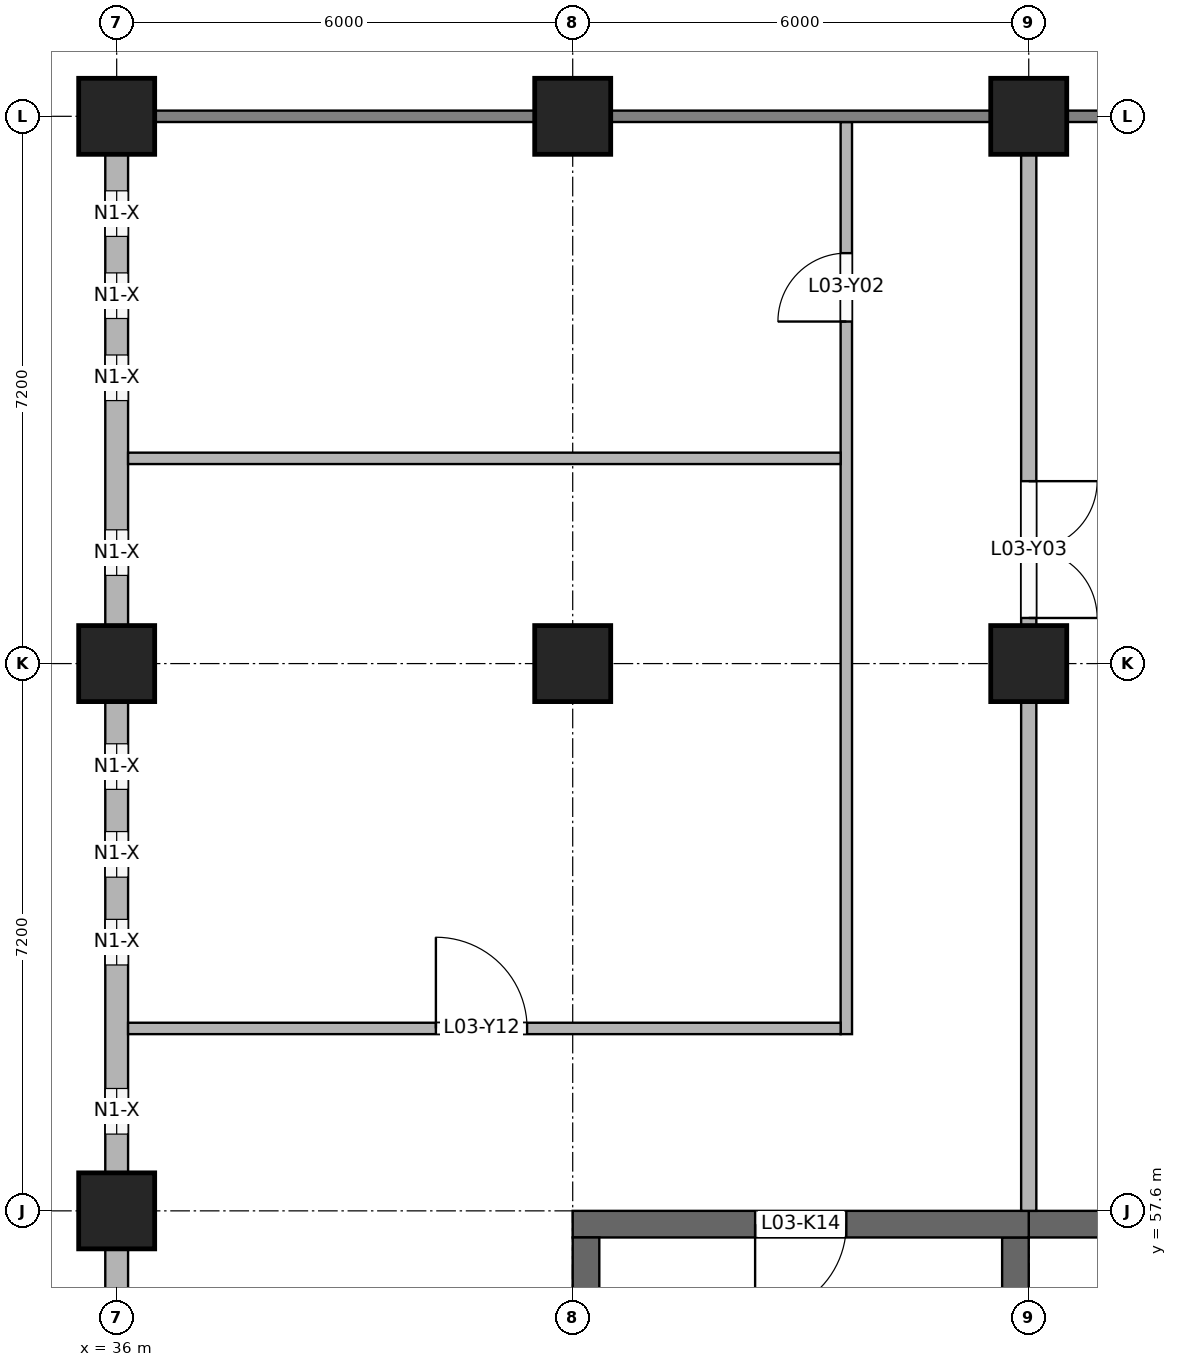
"""IFC4 building model, lengths in metres.
Left out: names, types, materials, properties, quantities, classifications, styles, units other than length and angle.
Written with IfcOpenShell. Run it as: python <this file> out.ifc"""

import sys

from ifc_helpers import new_model, si_unit, direction, frame, frame_2d, origin, origin_2d, place, context, subcontext, project, spatial, rectangle, extrude, element, fill, save


model = new_model("IFC4")
c1 = context("Model", 3, precision=1e-05, world=origin(), true_north=direction((0.0, 1.0)))
c2 = subcontext(c1, "Body", "Model", "MODEL_VIEW")
j1 = project(units=[si_unit("LENGTHUNIT", "METRE"), si_unit("PLANEANGLEUNIT", "RADIAN")], contexts=[c1])
p1 = place(None, origin())
s1 = spatial("IfcSite", under=j1, at=p1, CompositionType="ELEMENT")
p2 = place(p1, origin())
s2 = spatial("IfcBuilding", under=s1, at=p2, CompositionType="ELEMENT")
p3 = place(p2, frame((0.0, 0.0, 12.6)))
s3 = spatial("IfcBuildingStorey", under=s2, at=p3, CompositionType="ELEMENT", Elevation=12.6)
p4 = place(p3, frame((42.0, 57.425, 0.0), z_axis=(0.0, 0.0, 1.0), x_axis=(1.0, 0.0, 0.0)))
e1 = element("IfcWall", 1, at=p4, inside=s3, PredefinedType="SHEAR", context=c2, shape_type="SweptSolid", body=[
    extrude(rectangle(XDim=6.0, YDim=0.35, at=frame_2d((3.0, 0.0))), origin(), (0.0, 0.0, 1.0), 4.0),
])
p5 = place(p4, frame((2.4, 0.0, 0.0)))
e2 = element("IfcOpeningElement", 2, at=p5, cuts=e1, PredefinedType="OPENING", context=c2, shape_type="SweptSolid", body=[
    extrude(rectangle(XDim=1.2, YDim=2.1, at=frame_2d((0.6, 1.05))), frame((0.0, 0.185, 0.0), z_axis=(0.0, -1.0, 0.0), x_axis=(1.0, 0.0, 0.0)), (0.0, 0.0, 1.0), 0.37),
])
for number, where, z_axis, x_axis in (
    (3, (42.175, 50.75, 0.0), (0.0, 0.0, 1.0), (0.0, 1.0, 0.0)),
    (4, (47.825, 50.75, 0.0), (0.0, 0.0, 1.0), (0.0, 1.0, 0.0)),
):
    element("IfcWall", number, at=place(p3, frame(where, z_axis=z_axis, x_axis=x_axis)), inside=s3, PredefinedType="SHEAR", context=c2, shape_type="SweptSolid", body=[
        extrude(rectangle(XDim=6.5, YDim=0.35, at=frame_2d((3.25, 0.0))), origin(), (0.0, 0.0, 1.0), 4.0),
    ])
p6 = place(p3, frame((48.0, 57.425, 0.0), z_axis=(0.0, 0.0, 1.0), x_axis=(1.0, 0.0, 0.0)))
e5 = element("IfcWall", 5, at=p6, inside=s3, PredefinedType="SHEAR", context=c2, shape_type="SweptSolid", body=[
    extrude(rectangle(XDim=3.0, YDim=0.35, at=frame_2d((1.5, 0.0))), origin(), (0.0, 0.0, 1.0), 4.2),
])
for number, where, z_axis, x_axis in (
    (6, (36.0, 57.6, 0.0), (0.0, 0.0, 1.0), (1.0, 0.0, 0.0)),
    (7, (36.0, 64.8, 0.0), (0.0, 0.0, 1.0), (1.0, 0.0, 0.0)),
    (8, (42.0, 64.8, 0.0), (0.0, 0.0, 1.0), (1.0, 0.0, 0.0)),
    (9, (48.0, 64.8, 0.0), (0.0, 0.0, 1.0), (1.0, 0.0, 0.0)),
    (10, (36.0, 72.0, 0.0), (0.0, 0.0, 1.0), (1.0, 0.0, 0.0)),
    (11, (42.0, 72.0, 0.0), (0.0, 0.0, 1.0), (1.0, 0.0, 0.0)),
    (12, (48.0, 72.0, 0.0), (0.0, 0.0, 1.0), (1.0, 0.0, 0.0)),
):
    element("IfcColumn", number, at=place(p3, frame(where, z_axis=z_axis, x_axis=x_axis)), inside=s3, PredefinedType="COLUMN", context=c2, shape_type="SweptSolid", body=[
        extrude(rectangle(XDim=1.0, YDim=1.0, at=origin_2d()), origin(), (0.0, 0.0, 1.0), 4.0),
    ])
p7 = place(p3, frame((36.0, 50.9, 0.0), z_axis=(0.0, 0.0, 1.0), x_axis=(0.0, 1.0, 0.0)))
e13 = element("IfcWall", 13, at=p7, inside=s3, PredefinedType="SOLIDWALL", context=c2, shape_type="SweptSolid", body=[
    extrude(rectangle(XDim=6.2, YDim=0.3, at=frame_2d((3.1, 0.0))), origin(), (0.0, 0.0, 1.0), 3.1),
])
p8 = place(p7, frame((0.533, 0.0, 0.9)))
e14 = element("IfcOpeningElement", 14, at=p8, cuts=e13, PredefinedType="OPENING", context=c2, shape_type="SweptSolid", body=[
    extrude(rectangle(XDim=0.6, YDim=1.9, at=frame_2d((0.3, 0.95))), frame((0.0, 0.16, 0.0), z_axis=(0.0, -1.0, 0.0), x_axis=(1.0, 0.0, 0.0)), (0.0, 0.0, 1.0), 0.32),
])
p9 = place(p7, frame((1.667, 0.0, 0.9)))
e15 = element("IfcOpeningElement", 15, at=p9, cuts=e13, PredefinedType="OPENING", context=c2, shape_type="SweptSolid", body=[
    extrude(rectangle(XDim=0.6, YDim=1.9, at=frame_2d((0.3, 0.95))), frame((0.0, 0.16, 0.0), z_axis=(0.0, -1.0, 0.0), x_axis=(1.0, 0.0, 0.0)), (0.0, 0.0, 1.0), 0.32),
])
p10 = place(p7, frame((2.8, 0.0, 0.9)))
e16 = element("IfcOpeningElement", 16, at=p10, cuts=e13, PredefinedType="OPENING", context=c2, shape_type="SweptSolid", body=[
    extrude(rectangle(XDim=0.6, YDim=1.9, at=frame_2d((0.3, 0.95))), frame((0.0, 0.16, 0.0), z_axis=(0.0, -1.0, 0.0), x_axis=(1.0, 0.0, 0.0)), (0.0, 0.0, 1.0), 0.32),
])
p11 = place(p7, frame((3.933, 0.0, 0.9)))
e17 = element("IfcOpeningElement", 17, at=p11, cuts=e13, PredefinedType="OPENING", context=c2, shape_type="SweptSolid", body=[
    extrude(rectangle(XDim=0.6, YDim=1.9, at=frame_2d((0.3, 0.95))), frame((0.0, 0.16, 0.0), z_axis=(0.0, -1.0, 0.0), x_axis=(1.0, 0.0, 0.0)), (0.0, 0.0, 1.0), 0.32),
])
p12 = place(p7, frame((5.067, 0.0, 0.9)))
e18 = element("IfcOpeningElement", 18, at=p12, cuts=e13, PredefinedType="OPENING", context=c2, shape_type="SweptSolid", body=[
    extrude(rectangle(XDim=0.6, YDim=1.9, at=frame_2d((0.3, 0.95))), frame((0.0, 0.16, 0.0), z_axis=(0.0, -1.0, 0.0), x_axis=(1.0, 0.0, 0.0)), (0.0, 0.0, 1.0), 0.32),
])
p13 = place(p3, frame((36.0, 58.1, 0.0), z_axis=(0.0, 0.0, 1.0), x_axis=(0.0, 1.0, 0.0)))
e19 = element("IfcWall", 19, at=p13, inside=s3, PredefinedType="SOLIDWALL", context=c2, shape_type="SweptSolid", body=[
    extrude(rectangle(XDim=6.2, YDim=0.3, at=frame_2d((3.1, 0.0))), origin(), (0.0, 0.0, 1.0), 3.1),
])
p14 = place(p13, frame((0.51, 0.0, 0.9)))
e20 = element("IfcOpeningElement", 20, at=p14, cuts=e19, PredefinedType="OPENING", context=c2, shape_type="SweptSolid", body=[
    extrude(rectangle(XDim=0.6, YDim=1.9, at=frame_2d((0.3, 0.95))), frame((0.0, 0.16, 0.0), z_axis=(0.0, -1.0, 0.0), x_axis=(1.0, 0.0, 0.0)), (0.0, 0.0, 1.0), 0.32),
])
p15 = place(p13, frame((2.735, 0.0, 0.9)))
e21 = element("IfcOpeningElement", 21, at=p15, cuts=e19, PredefinedType="OPENING", context=c2, shape_type="SweptSolid", body=[
    extrude(rectangle(XDim=0.6, YDim=1.9, at=frame_2d((0.3, 0.95))), frame((0.0, 0.16, 0.0), z_axis=(0.0, -1.0, 0.0), x_axis=(1.0, 0.0, 0.0)), (0.0, 0.0, 1.0), 0.32),
])
p16 = place(p13, frame((3.89, 0.0, 0.9)))
e22 = element("IfcOpeningElement", 22, at=p16, cuts=e19, PredefinedType="OPENING", context=c2, shape_type="SweptSolid", body=[
    extrude(rectangle(XDim=0.6, YDim=1.9, at=frame_2d((0.3, 0.95))), frame((0.0, 0.16, 0.0), z_axis=(0.0, -1.0, 0.0), x_axis=(1.0, 0.0, 0.0)), (0.0, 0.0, 1.0), 0.32),
])
p17 = place(p13, frame((5.045, 0.0, 0.9)))
e23 = element("IfcOpeningElement", 23, at=p17, cuts=e19, PredefinedType="OPENING", context=c2, shape_type="SweptSolid", body=[
    extrude(rectangle(XDim=0.6, YDim=1.9, at=frame_2d((0.3, 0.95))), frame((0.0, 0.16, 0.0), z_axis=(0.0, -1.0, 0.0), x_axis=(1.0, 0.0, 0.0)), (0.0, 0.0, 1.0), 0.32),
])
p18 = place(p3, frame((36.0, 65.3, 0.0), z_axis=(0.0, 0.0, 1.0), x_axis=(0.0, 1.0, 0.0)))
e24 = element("IfcWall", 24, at=p18, inside=s3, PredefinedType="SOLIDWALL", context=c2, shape_type="SweptSolid", body=[
    extrude(rectangle(XDim=6.2, YDim=0.3, at=frame_2d((3.1, 0.0))), origin(), (0.0, 0.0, 1.0), 3.1),
])
p19 = place(p18, frame((0.66, 0.0, 0.9)))
e25 = element("IfcOpeningElement", 25, at=p19, cuts=e24, PredefinedType="OPENING", context=c2, shape_type="SweptSolid", body=[
    extrude(rectangle(XDim=0.6, YDim=1.9, at=frame_2d((0.3, 0.95))), frame((0.0, 0.16, 0.0), z_axis=(0.0, -1.0, 0.0), x_axis=(1.0, 0.0, 0.0)), (0.0, 0.0, 1.0), 0.32),
])
p20 = place(p18, frame((2.96, 0.0, 0.9)))
e26 = element("IfcOpeningElement", 26, at=p20, cuts=e24, PredefinedType="OPENING", context=c2, shape_type="SweptSolid", body=[
    extrude(rectangle(XDim=0.6, YDim=1.9, at=frame_2d((0.3, 0.95))), frame((0.0, 0.16, 0.0), z_axis=(0.0, -1.0, 0.0), x_axis=(1.0, 0.0, 0.0)), (0.0, 0.0, 1.0), 0.32),
])
p21 = place(p18, frame((4.04, 0.0, 0.9)))
e27 = element("IfcOpeningElement", 27, at=p21, cuts=e24, PredefinedType="OPENING", context=c2, shape_type="SweptSolid", body=[
    extrude(rectangle(XDim=0.6, YDim=1.9, at=frame_2d((0.3, 0.95))), frame((0.0, 0.16, 0.0), z_axis=(0.0, -1.0, 0.0), x_axis=(1.0, 0.0, 0.0)), (0.0, 0.0, 1.0), 0.32),
])
p22 = place(p18, frame((5.12, 0.0, 0.9)))
e28 = element("IfcOpeningElement", 28, at=p22, cuts=e24, PredefinedType="OPENING", context=c2, shape_type="SweptSolid", body=[
    extrude(rectangle(XDim=0.6, YDim=1.9, at=frame_2d((0.3, 0.95))), frame((0.0, 0.16, 0.0), z_axis=(0.0, -1.0, 0.0), x_axis=(1.0, 0.0, 0.0)), (0.0, 0.0, 1.0), 0.32),
])
p23 = place(p3, frame((45.6, 59.925, 0.0), z_axis=(0.0, 0.0, 1.0), x_axis=(0.0, 1.0, 0.0)))
e29 = element("IfcWall", 29, at=p23, inside=s3, PredefinedType="PARTITIONING", context=c2, shape_type="SweptSolid", body=[
    extrude(rectangle(XDim=12.0, YDim=0.15, at=frame_2d((6.0, 0.0))), origin(), (0.0, 0.0, 1.0), 3.2),
])
p24 = place(p23, frame((9.375, 0.0, 0.0)))
e30 = element("IfcOpeningElement", 30, at=p24, cuts=e29, PredefinedType="OPENING", context=c2, shape_type="SweptSolid", body=[
    extrude(rectangle(XDim=0.9, YDim=2.1, at=frame_2d((0.45, 1.05))), frame((0.0, 0.085, 0.0), z_axis=(0.0, -1.0, 0.0), x_axis=(1.0, 0.0, 0.0)), (0.0, 0.0, 1.0), 0.17),
])
p25 = place(p3, frame((48.0, 57.6, 0.0), z_axis=(0.0, 0.0, 1.0), x_axis=(0.0, 1.0, 0.0)))
e31 = element("IfcWall", 31, at=p25, inside=s3, PredefinedType="PARTITIONING", context=c2, shape_type="SweptSolid", body=[
    extrude(rectangle(XDim=6.7, YDim=0.2, at=frame_2d((3.35, 0.0))), origin(), (0.0, 0.0, 1.0), 8.2),
])
p26 = place(p3, frame((48.0, 65.3, 0.0), z_axis=(0.0, 0.0, 1.0), x_axis=(0.0, 1.0, 0.0)))
e32 = element("IfcWall", 32, at=p26, inside=s3, PredefinedType="PARTITIONING", context=c2, shape_type="SweptSolid", body=[
    extrude(rectangle(XDim=6.2, YDim=0.2, at=frame_2d((3.1, 0.0))), origin(), (0.0, 0.0, 1.0), 3.1),
])
p27 = place(p26, frame((0.1, 0.0, 0.0)))
e33 = element("IfcOpeningElement", 33, at=p27, cuts=e32, PredefinedType="OPENING", context=c2, shape_type="SweptSolid", body=[
    extrude(rectangle(XDim=1.8, YDim=2.1, at=frame_2d((0.9, 1.05))), frame((0.0, 0.11, 0.0), z_axis=(0.0, -1.0, 0.0), x_axis=(1.0, 0.0, 0.0)), (0.0, 0.0, 1.0), 0.22),
])
p28 = place(p3, frame((36.15, 60.0, 0.0), z_axis=(0.0, 0.0, 1.0), x_axis=(1.0, 0.0, 0.0)))
e34 = element("IfcWall", 34, at=p28, inside=s3, PredefinedType="PARTITIONING", context=c2, shape_type="SweptSolid", body=[
    extrude(rectangle(XDim=9.375, YDim=0.15, at=frame_2d((4.688, 0.0))), origin(), (0.0, 0.0, 1.0), 3.1),
])
p29 = place(p28, frame((4.05, 0.0, 0.0)))
e35 = element("IfcOpeningElement", 35, at=p29, cuts=e34, PredefinedType="OPENING", context=c2, shape_type="SweptSolid", body=[
    extrude(rectangle(XDim=1.2, YDim=2.1, at=frame_2d((0.6, 1.05))), frame((0.0, 0.085, 0.0), z_axis=(0.0, -1.0, 0.0), x_axis=(1.0, 0.0, 0.0)), (0.0, 0.0, 1.0), 0.17),
])
p30 = place(p3, frame((36.15, 67.5, 0.0), z_axis=(0.0, 0.0, 1.0), x_axis=(1.0, 0.0, 0.0)))
e36 = element("IfcWall", 36, at=p30, inside=s3, PredefinedType="PARTITIONING", context=c2, shape_type="SweptSolid", body=[
    extrude(rectangle(XDim=9.375, YDim=0.15, at=frame_2d((4.688, 0.0))), origin(), (0.0, 0.0, 1.0), 3.1),
])
p31 = place(p14, origin())
e37 = element("IfcWindow", 37, at=p31, inside=s3, PartitioningType="SINGLE_PANEL", PredefinedType="WINDOW", context=c2, shape_type="SweptSolid", body=[
    extrude(rectangle(XDim=0.6, YDim=1.9, at=frame_2d((0.3, 0.95))), frame((0.0, 0.03, 0.0), z_axis=(0.0, -1.0, 0.0), x_axis=(1.0, 0.0, 0.0)), (0.0, 0.0, 1.0), 0.06),
])
fill(e20, e37)
p32 = place(p15, origin())
e38 = element("IfcWindow", 38, at=p32, inside=s3, PartitioningType="SINGLE_PANEL", PredefinedType="WINDOW", context=c2, shape_type="SweptSolid", body=[
    extrude(rectangle(XDim=0.6, YDim=1.9, at=frame_2d((0.3, 0.95))), frame((0.0, 0.03, 0.0), z_axis=(0.0, -1.0, 0.0), x_axis=(1.0, 0.0, 0.0)), (0.0, 0.0, 1.0), 0.06),
])
fill(e21, e38)
p33 = place(p16, origin())
e39 = element("IfcWindow", 39, at=p33, inside=s3, PartitioningType="SINGLE_PANEL", PredefinedType="WINDOW", context=c2, shape_type="SweptSolid", body=[
    extrude(rectangle(XDim=0.6, YDim=1.9, at=frame_2d((0.3, 0.95))), frame((0.0, 0.03, 0.0), z_axis=(0.0, -1.0, 0.0), x_axis=(1.0, 0.0, 0.0)), (0.0, 0.0, 1.0), 0.06),
])
fill(e22, e39)
p34 = place(p17, origin())
e40 = element("IfcWindow", 40, at=p34, inside=s3, PartitioningType="SINGLE_PANEL", PredefinedType="WINDOW", context=c2, shape_type="SweptSolid", body=[
    extrude(rectangle(XDim=0.6, YDim=1.9, at=frame_2d((0.3, 0.95))), frame((0.0, 0.03, 0.0), z_axis=(0.0, -1.0, 0.0), x_axis=(1.0, 0.0, 0.0)), (0.0, 0.0, 1.0), 0.06),
])
fill(e23, e40)
p35 = place(p19, origin())
e41 = element("IfcWindow", 41, at=p35, inside=s3, PartitioningType="SINGLE_PANEL", PredefinedType="WINDOW", context=c2, shape_type="SweptSolid", body=[
    extrude(rectangle(XDim=0.6, YDim=1.9, at=frame_2d((0.3, 0.95))), frame((0.0, 0.03, 0.0), z_axis=(0.0, -1.0, 0.0), x_axis=(1.0, 0.0, 0.0)), (0.0, 0.0, 1.0), 0.06),
])
fill(e25, e41)
p36 = place(p20, origin())
e42 = element("IfcWindow", 42, at=p36, inside=s3, PartitioningType="SINGLE_PANEL", PredefinedType="WINDOW", context=c2, shape_type="SweptSolid", body=[
    extrude(rectangle(XDim=0.6, YDim=1.9, at=frame_2d((0.3, 0.95))), frame((0.0, 0.03, 0.0), z_axis=(0.0, -1.0, 0.0), x_axis=(1.0, 0.0, 0.0)), (0.0, 0.0, 1.0), 0.06),
])
fill(e26, e42)
p37 = place(p21, origin())
e43 = element("IfcWindow", 43, at=p37, inside=s3, PartitioningType="SINGLE_PANEL", PredefinedType="WINDOW", context=c2, shape_type="SweptSolid", body=[
    extrude(rectangle(XDim=0.6, YDim=1.9, at=frame_2d((0.3, 0.95))), frame((0.0, 0.03, 0.0), z_axis=(0.0, -1.0, 0.0), x_axis=(1.0, 0.0, 0.0)), (0.0, 0.0, 1.0), 0.06),
])
fill(e27, e43)
p38 = place(p22, origin())
e44 = element("IfcWindow", 44, at=p38, inside=s3, PartitioningType="SINGLE_PANEL", PredefinedType="WINDOW", context=c2, shape_type="SweptSolid", body=[
    extrude(rectangle(XDim=0.6, YDim=1.9, at=frame_2d((0.3, 0.95))), frame((0.0, 0.03, 0.0), z_axis=(0.0, -1.0, 0.0), x_axis=(1.0, 0.0, 0.0)), (0.0, 0.0, 1.0), 0.06),
])
fill(e28, e44)
p39 = place(p5, frame((1.2, 0.0, 0.0), z_axis=(0.0, 0.0, 1.0), x_axis=(-1.0, 0.0, 0.0)))
e45 = element("IfcDoor", 45, at=p39, inside=s3, OperationType="SINGLE_SWING_RIGHT", PredefinedType="DOOR", context=c2, shape_type="SweptSolid", body=[
    extrude(rectangle(XDim=1.2, YDim=2.1, at=frame_2d((0.6, 1.05))), frame((0.0, 0.025, 0.0), z_axis=(0.0, -1.0, 0.0), x_axis=(1.0, 0.0, 0.0)), (0.0, 0.0, 1.0), 0.05),
])
fill(e2, e45)
p40 = place(p24, origin())
e46 = element("IfcDoor", 46, at=p40, inside=s3, OperationType="SINGLE_SWING_LEFT", PredefinedType="DOOR", context=c2, shape_type="SweptSolid", body=[
    extrude(rectangle(XDim=0.9, YDim=2.1, at=frame_2d((0.45, 1.05))), frame((0.0, 0.025, 0.0), z_axis=(0.0, -1.0, 0.0), x_axis=(1.0, 0.0, 0.0)), (0.0, 0.0, 1.0), 0.05),
])
fill(e30, e46)
p41 = place(p27, frame((1.8, 0.0, 0.0), z_axis=(0.0, 0.0, 1.0), x_axis=(-1.0, 0.0, 0.0)))
e47 = element("IfcDoor", 47, at=p41, inside=s3, OperationType="DOUBLE_DOOR_SINGLE_SWING", PredefinedType="DOOR", context=c2, shape_type="SweptSolid", body=[
    extrude(rectangle(XDim=1.8, YDim=2.1, at=frame_2d((0.9, 1.05))), frame((0.0, 0.025, 0.0), z_axis=(0.0, -1.0, 0.0), x_axis=(1.0, 0.0, 0.0)), (0.0, 0.0, 1.0), 0.05),
])
fill(e33, e47)
p42 = place(p29, origin())
e48 = element("IfcDoor", 48, at=p42, inside=s3, OperationType="SINGLE_SWING_LEFT", PredefinedType="DOOR", context=c2, shape_type="SweptSolid", body=[
    extrude(rectangle(XDim=1.2, YDim=2.1, at=frame_2d((0.6, 1.05))), frame((0.0, 0.025, 0.0), z_axis=(0.0, -1.0, 0.0), x_axis=(1.0, 0.0, 0.0)), (0.0, 0.0, 1.0), 0.05),
])
fill(e35, e48)
save(model, sys.argv[1])
